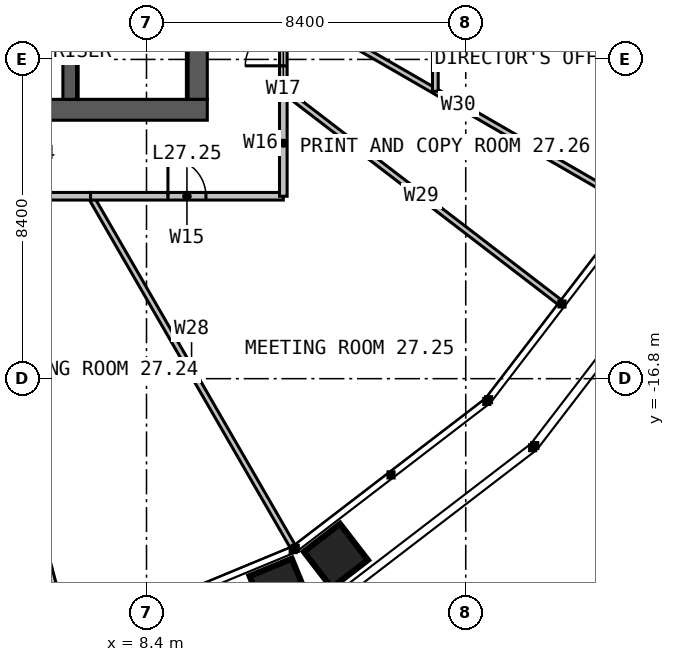
"""IFC4 building model, lengths in metres.
Left out: names, types, materials, properties, quantities, classifications, styles, units other than length and angle.
Written with IfcOpenShell. Run it as: python <this file> out.ifc"""

import sys

from ifc_helpers import new_model, si_unit, direction, frame, frame_2d, origin, place, context, subcontext, project, spatial, rectangle, extrude, element, fill, save


model = new_model("IFC4")
c1 = context("Model", 3, precision=1e-05, world=origin(), true_north=direction((0.0, 1.0)))
c2 = subcontext(c1, "Body", "Model", "MODEL_VIEW")
j1 = project(units=[si_unit("LENGTHUNIT", "METRE"), si_unit("PLANEANGLEUNIT", "RADIAN")], contexts=[c1])
p1 = place(None, origin())
s1 = spatial("IfcSite", under=j1, at=p1, CompositionType="ELEMENT")
p2 = place(p1, origin())
s2 = spatial("IfcBuilding", under=s1, at=p2, CompositionType="ELEMENT")
p3 = place(p2, frame((0.0, 0.0, 114.0)))
s3 = spatial("IfcBuildingStorey", under=s2, at=p3, CompositionType="ELEMENT", Elevation=114.0)
p4 = place(p3, frame((10.0, -9.725, 0.0), z_axis=(0.0, 0.0, 1.0), x_axis=(-1.0, 0.0, 0.0)))
e1 = element("IfcWall", 1, at=p4, inside=s3, PredefinedType="SOLIDWALL", context=c2, shape_type="SweptSolid", body=[
    extrude(rectangle(XDim=20.0, YDim=0.55, at=frame_2d((10.0, 0.0))), origin(), (0.0, 0.0, 1.0), 4.0),
])
p5 = place(p4, frame((6.875, 0.0, 0.0)))
e2 = element("IfcOpeningElement", 2, at=p5, cuts=e1, PredefinedType="OPENING", context=c2, shape_type="SweptSolid", body=[
    extrude(rectangle(XDim=1.2, YDim=2.2, at=frame_2d((0.6, 1.1))), frame((0.0, 0.285, 0.0), z_axis=(0.0, -1.0, 0.0), x_axis=(1.0, 0.0, 0.0)), (0.0, 0.0, 1.0), 0.57),
])
p6 = place(p3, frame((9.725, -9.45, 0.0), z_axis=(0.0, 0.0, 1.0), x_axis=(0.0, 1.0, 0.0)))
e3 = element("IfcWall", 3, at=p6, inside=s3, PredefinedType="SOLIDWALL", context=c2, shape_type="SweptSolid", body=[
    extrude(rectangle(XDim=18.9, YDim=0.55, at=frame_2d((9.45, 0.0))), origin(), (0.0, 0.0, 1.0), 4.0),
])
p7 = place(p3, frame((6.4, 9.45, 0.0), z_axis=(0.0, 0.0, 1.0), x_axis=(0.0, -1.0, 0.0)))
e4 = element("IfcWall", 4, at=p7, inside=s3, PredefinedType="SOLIDWALL", context=c2, shape_type="SweptSolid", body=[
    extrude(rectangle(XDim=18.9, YDim=0.4, at=frame_2d((9.45, 0.0))), origin(), (0.0, 0.0, 1.0), 4.0),
])
p8 = place(p7, frame((8.95, 0.0, 0.0)))
e5 = element("IfcOpeningElement", 5, at=p8, cuts=e4, PredefinedType="OPENING", context=c2, shape_type="SweptSolid", body=[
    extrude(rectangle(XDim=1.0, YDim=2.2, at=frame_2d((0.5, 1.1))), frame((0.0, 0.21, 0.0), z_axis=(0.0, -1.0, 0.0), x_axis=(1.0, 0.0, 0.0)), (0.0, 0.0, 1.0), 0.42),
])
p9 = place(p3, frame((12.0, -6.928, 0.0), z_axis=(0.0, 0.0, 1.0), x_axis=(0.866024197053, -0.500002090115, 0.0)))
e6 = element("IfcWall", 6, at=p9, inside=s3, PredefinedType="PARTITIONING", context=c2, shape_type="SweptSolid", body=[
    extrude(rectangle(XDim=10.631, YDim=0.15, at=frame_2d((5.315, 0.0))), origin(), (0.0, 0.0, 1.0), 2.79),
])
p10 = place(p3, frame((3.215, -12.0, 0.0), z_axis=(0.0, 0.0, 1.0), x_axis=(0.258814986396, -0.965926913807, 0.0)))
e7 = element("IfcWall", 7, at=p10, inside=s3, PredefinedType="PARTITIONING", context=c2, shape_type="SweptSolid", body=[
    extrude(rectangle(XDim=12.064, YDim=0.15, at=frame_2d((6.032, 0.0))), origin(), (0.0, 0.0, 1.0), 2.79),
])
p11 = place(p3, frame((6.928, -12.0, 0.0), z_axis=(0.0, 0.0, 1.0), x_axis=(0.500002090115, -0.866024197053, 0.0)))
e8 = element("IfcWall", 8, at=p11, inside=s3, PredefinedType="PARTITIONING", context=c2, shape_type="SweptSolid", body=[
    extrude(rectangle(XDim=10.631, YDim=0.15, at=frame_2d((5.315, 0.0))), origin(), (0.0, 0.0, 1.0), 2.79),
])
p12 = place(p3, frame((12.0, -9.208, 0.0), z_axis=(0.0, 0.0, 1.0), x_axis=(0.793357264949, -0.608756314261, 0.0)))
e9 = element("IfcWall", 9, at=p12, inside=s3, PredefinedType="PARTITIONING", context=c2, shape_type="SweptSolid", body=[
    extrude(rectangle(XDim=9.152, YDim=0.15, at=frame_2d((4.576, 0.0))), origin(), (0.0, 0.0, 1.0), 2.79),
])
p13 = place(p3, frame((16.0, -9.238, 0.0), z_axis=(0.0, 0.0, 1.0), x_axis=(0.0, 1.0, 0.0)))
e10 = element("IfcWall", 10, at=p13, inside=s3, PredefinedType="PARTITIONING", context=c2, shape_type="SweptSolid", body=[
    extrude(rectangle(XDim=18.475, YDim=0.15, at=frame_2d((9.238, 0.0))), origin(), (0.0, 0.0, 1.0), 2.79),
])
p14 = place(p13, frame((1.975, 0.0, 0.0)))
e11 = element("IfcOpeningElement", 11, at=p14, cuts=e10, PredefinedType="OPENING", context=c2, shape_type="SweptSolid", body=[
    extrude(rectangle(XDim=1.0, YDim=2.2, at=frame_2d((0.5, 1.1))), frame((0.0, 0.085, 0.0), z_axis=(0.0, -1.0, 0.0), x_axis=(1.0, 0.0, 0.0)), (0.0, 0.0, 1.0), 0.17),
])
p15 = place(p13, frame((6.594, 0.0, 0.0)))
e12 = element("IfcOpeningElement", 12, at=p15, cuts=e10, PredefinedType="OPENING", context=c2, shape_type="SweptSolid", body=[
    extrude(rectangle(XDim=1.0, YDim=2.2, at=frame_2d((0.5, 1.1))), frame((0.0, 0.085, 0.0), z_axis=(0.0, -1.0, 0.0), x_axis=(1.0, 0.0, 0.0)), (0.0, 0.0, 1.0), 0.17),
])
p16 = place(p13, frame((9.791, 0.0, 0.0)))
e13 = element("IfcOpeningElement", 13, at=p16, cuts=e10, PredefinedType="OPENING", context=c2, shape_type="SweptSolid", body=[
    extrude(rectangle(XDim=1.0, YDim=2.2, at=frame_2d((0.5, 1.1))), frame((0.0, 0.085, 0.0), z_axis=(0.0, -1.0, 0.0), x_axis=(1.0, 0.0, 0.0)), (0.0, 0.0, 1.0), 0.17),
])
p17 = place(p13, frame((13.104, 0.0, 0.0)))
e14 = element("IfcOpeningElement", 14, at=p17, cuts=e10, PredefinedType="OPENING", context=c2, shape_type="SweptSolid", body=[
    extrude(rectangle(XDim=1.0, YDim=2.2, at=frame_2d((0.5, 1.1))), frame((0.0, 0.085, 0.0), z_axis=(0.0, -1.0, 0.0), x_axis=(1.0, 0.0, 0.0)), (0.0, 0.0, 1.0), 0.17),
])
p18 = place(p13, frame((16.67, 0.0, 0.0)))
e15 = element("IfcOpeningElement", 15, at=p18, cuts=e10, PredefinedType="OPENING", context=c2, shape_type="SweptSolid", body=[
    extrude(rectangle(XDim=1.0, YDim=2.2, at=frame_2d((0.5, 1.1))), frame((0.0, 0.085, 0.0), z_axis=(0.0, -1.0, 0.0), x_axis=(1.0, 0.0, 0.0)), (0.0, 0.0, 1.0), 0.17),
])
p19 = place(p3, frame((3.215, -12.0, 0.0), z_axis=(0.0, 0.0, 1.0), x_axis=(1.0, 0.0, 0.0)))
e16 = element("IfcWall", 16, at=p19, inside=s3, PredefinedType="PARTITIONING", context=c2, shape_type="SweptSolid", body=[
    extrude(rectangle(XDim=3.713, YDim=0.2, at=frame_2d((1.856, 0.0))), origin(), (0.0, 0.0, 1.0), 3.8),
])
p20 = place(p19, frame((1.356, 0.0, 0.0)))
e17 = element("IfcOpeningElement", 17, at=p20, cuts=e16, PredefinedType="OPENING", context=c2, shape_type="SweptSolid", body=[
    extrude(rectangle(XDim=1.0, YDim=2.2, at=frame_2d((0.5, 1.1))), frame((0.0, 0.11, 0.0), z_axis=(0.0, -1.0, 0.0), x_axis=(1.0, 0.0, 0.0)), (0.0, 0.0, 1.0), 0.22),
])
p21 = place(p3, frame((6.928, -12.0, 0.0), z_axis=(0.0, 0.0, 1.0), x_axis=(1.0, 0.0, 0.0)))
e18 = element("IfcWall", 18, at=p21, inside=s3, PredefinedType="PARTITIONING", context=c2, shape_type="SweptSolid", body=[
    extrude(rectangle(XDim=5.072, YDim=0.2, at=frame_2d((2.536, 0.0))), origin(), (0.0, 0.0, 1.0), 3.8),
])
p22 = place(p21, frame((2.036, 0.0, 0.0)))
e19 = element("IfcOpeningElement", 19, at=p22, cuts=e18, PredefinedType="OPENING", context=c2, shape_type="SweptSolid", body=[
    extrude(rectangle(XDim=1.0, YDim=2.2, at=frame_2d((0.5, 1.1))), frame((0.0, 0.11, 0.0), z_axis=(0.0, -1.0, 0.0), x_axis=(1.0, 0.0, 0.0)), (0.0, 0.0, 1.0), 0.22),
])
p23 = place(p3, frame((12.0, -12.0, 0.0), z_axis=(0.0, 0.0, 1.0), x_axis=(0.0, 1.0, 0.0)))
e20 = element("IfcWall", 20, at=p23, inside=s3, PredefinedType="PARTITIONING", context=c2, shape_type="SweptSolid", body=[
    extrude(rectangle(XDim=2.792, YDim=0.2, at=frame_2d((1.396, 0.0))), origin(), (0.0, 0.0, 1.0), 3.8),
])
p24 = place(p3, frame((12.0, -9.208, 0.0), z_axis=(0.0, 0.0, 1.0), x_axis=(0.0, 1.0, 0.0)))
e21 = element("IfcWall", 21, at=p24, inside=s3, PredefinedType="PARTITIONING", context=c2, shape_type="SweptSolid", body=[
    extrude(rectangle(XDim=2.28, YDim=0.2, at=frame_2d((1.14, 0.0))), origin(), (0.0, 0.0, 1.0), 3.8),
])
p25 = place(p24, frame((0.64, 0.0, 0.0)))
e22 = element("IfcOpeningElement", 22, at=p25, cuts=e21, PredefinedType="OPENING", context=c2, shape_type="SweptSolid", body=[
    extrude(rectangle(XDim=1.0, YDim=2.2, at=frame_2d((0.5, 1.1))), frame((0.0, 0.11, 0.0), z_axis=(0.0, -1.0, 0.0), x_axis=(1.0, 0.0, 0.0)), (0.0, 0.0, 1.0), 0.22),
])
p26 = place(p22, origin())
e23 = element("IfcDoor", 23, at=p26, inside=s3, OperationType="SINGLE_SWING_LEFT", PredefinedType="DOOR", context=c2, shape_type="SweptSolid", body=[
    extrude(rectangle(XDim=1.0, YDim=2.2, at=frame_2d((0.5, 1.1))), frame((0.0, 0.025, 0.0), z_axis=(0.0, -1.0, 0.0), x_axis=(1.0, 0.0, 0.0)), (0.0, 0.0, 1.0), 0.05),
])
fill(e19, e23)
p27 = place(p25, origin())
e24 = element("IfcDoor", 24, at=p27, inside=s3, OperationType="SINGLE_SWING_LEFT", PredefinedType="DOOR", context=c2, shape_type="SweptSolid", body=[
    extrude(rectangle(XDim=1.0, YDim=2.2, at=frame_2d((0.5, 1.1))), frame((0.0, 0.025, 0.0), z_axis=(0.0, -1.0, 0.0), x_axis=(1.0, 0.0, 0.0)), (0.0, 0.0, 1.0), 0.05),
])
fill(e22, e24)
save(model, sys.argv[1])
